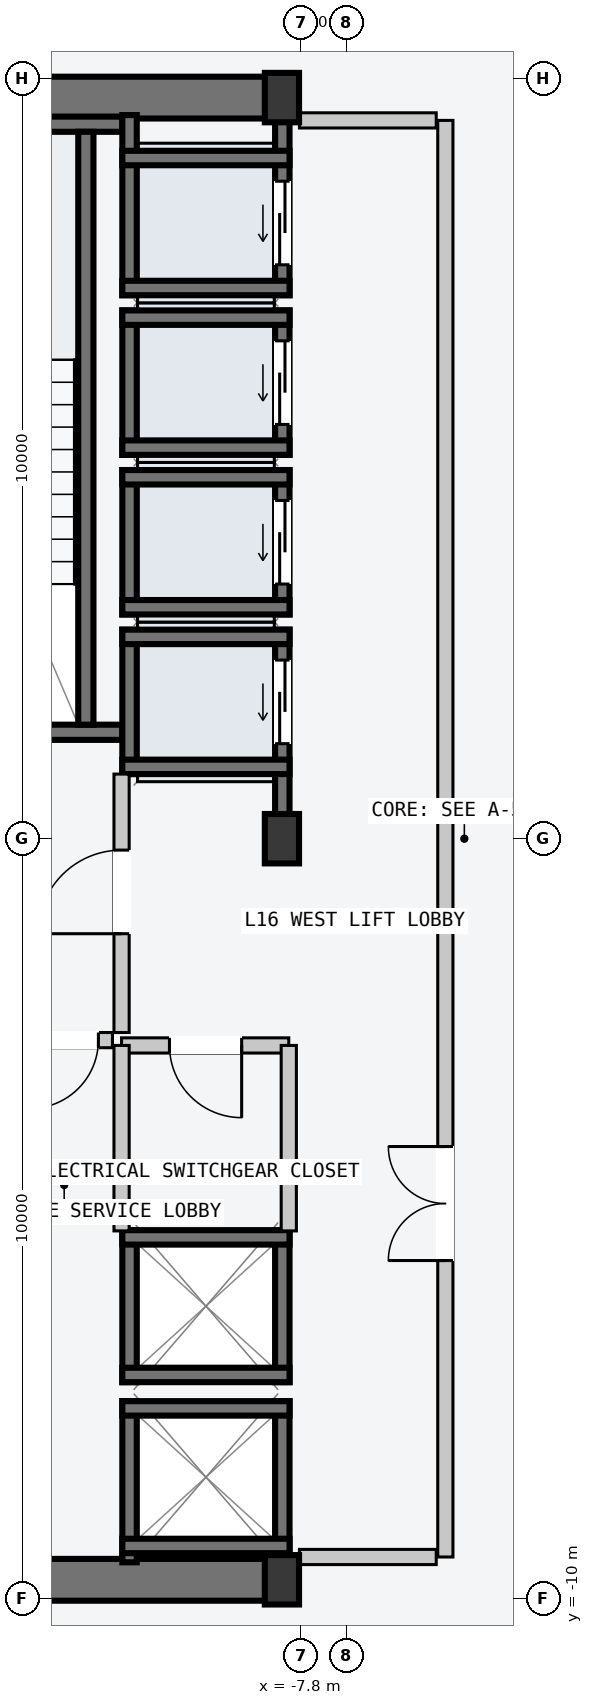
"""IFC4 building model, lengths in metres.
Left out: names, types, materials, properties, quantities, classifications, styles, units other than length and angle.
Written with IfcOpenShell. Run it as: python <this file> out.ifc"""

import sys

from ifc_helpers import new_model, si_unit, direction, frame, frame_2d, origin, origin_2d, place, context, subcontext, project, spatial, rectangle, i_section, extrude, element, fill, save


model = new_model("IFC4")
c1 = context("Model", 3, precision=1e-05, world=origin(), true_north=direction((0.0, 1.0)))
c2 = subcontext(c1, "Body", "Model", "MODEL_VIEW")
j1 = project(units=[si_unit("LENGTHUNIT", "METRE"), si_unit("PLANEANGLEUNIT", "RADIAN")], contexts=[c1])
p1 = place(None, origin())
s1 = spatial("IfcSite", under=j1, at=p1, CompositionType="ELEMENT")
p2 = place(p1, origin())
s2 = spatial("IfcBuilding", under=s1, at=p2, CompositionType="ELEMENT")
p3 = place(p2, frame((0.0, 0.0, 63.6)))
s3 = spatial("IfcBuildingStorey", under=s2, at=p3, CompositionType="ELEMENT", Elevation=63.6)
for number, where, z_axis, x_axis in (
    (1, (-14.53, -9.75, -0.2), (0.0, 0.0, 1.0), (1.0, 0.0, 0.0)),
    (2, (-14.53, 9.75, -0.2), (0.0, 0.0, 1.0), (1.0, 0.0, 0.0)),
):
    element("IfcWall", number, at=place(p3, frame(where, z_axis=z_axis, x_axis=x_axis)), inside=s3, PredefinedType="SHEAR", context=c2, shape_type="SweptSolid", body=[
        extrude(rectangle(XDim=6.46, YDim=0.55, at=frame_2d((3.23, 0.0))), origin(), (0.0, 0.0, 1.0), 3.6),
    ])
p4 = place(p3, frame((-14.25, 1.4, -0.2), z_axis=(0.0, 0.0, 1.0), x_axis=(1.0, 0.0, 0.0)))
e3 = element("IfcWall", 3, at=p4, inside=s3, PredefinedType="SOLIDWALL", context=c2, shape_type="SweptSolid", body=[
    extrude(rectangle(XDim=4.1, YDim=0.2, at=frame_2d((2.05, 0.0))), origin(), (0.0, 0.0, 1.0), 3.6),
])
p5 = place(p4, frame((1.5, 0.0, 0.2)))
e4 = element("IfcOpeningElement", 4, at=p5, cuts=e3, PredefinedType="OPENING", context=c2, shape_type="SweptSolid", body=[
    extrude(rectangle(XDim=1.12, YDim=2.18, at=frame_2d((0.56, 1.09))), frame((0.0, 0.11, 0.0), z_axis=(0.0, -1.0, 0.0), x_axis=(1.0, 0.0, 0.0)), (0.0, 0.0, 1.0), 0.22),
])
p6 = place(p3, frame((-14.25, 9.4, -0.2), z_axis=(0.0, 0.0, 1.0), x_axis=(1.0, 0.0, 0.0)))
e5 = element("IfcWall", 5, at=p6, inside=s3, PredefinedType="SOLIDWALL", context=c2, shape_type="SweptSolid", body=[
    extrude(rectangle(XDim=4.1, YDim=0.2, at=frame_2d((2.05, 0.0))), origin(), (0.0, 0.0, 1.0), 3.6),
])
p7 = place(p3, frame((-10.63, 1.5, -0.2), z_axis=(0.0, 0.0, 1.0), x_axis=(0.0, 1.0, 0.0)))
e6 = element("IfcWall", 6, at=p7, inside=s3, PredefinedType="SOLIDWALL", context=c2, shape_type="SweptSolid", body=[
    extrude(rectangle(XDim=7.8, YDim=0.2, at=frame_2d((3.9, 0.0))), origin(), (0.0, 0.0, 1.0), 3.6),
])
for number, where, z_axis, x_axis in (
    (7, (-8.05, -9.75, 0.0), (0.0, 0.0, 1.0), (1.0, 0.0, 0.0)),
    (8, (-8.05, 0.0, 0.0), (0.0, 0.0, 1.0), (1.0, 0.0, 0.0)),
    (9, (-8.05, 9.75, 0.0), (0.0, 0.0, 1.0), (1.0, 0.0, 0.0)),
):
    element("IfcColumn", number, at=place(p3, frame(where, z_axis=z_axis, x_axis=x_axis)), inside=s3, PredefinedType="COLUMN", context=c2, shape_type="SweptSolid", body=[
        extrude(i_section(OverallWidth=0.45, OverallDepth=0.65, WebThickness=0.025, FlangeThickness=0.04, at=origin_2d()), origin(), (0.0, 0.0, 1.0), 3.6),
    ])
p8 = place(p3, frame((-8.045, 0.21, -0.2), z_axis=(0.0, 0.0, 1.0), x_axis=(0.0, 1.0, 0.0)))
e10 = element("IfcWall", 10, at=p8, inside=s3, PredefinedType="SOLIDWALL", context=c2, shape_type="SweptSolid", body=[
    extrude(rectangle(XDim=2.54, YDim=0.19, at=frame_2d((1.27, 0.0))), origin(), (0.0, 0.0, 1.0), 3.6),
])
p9 = place(p8, frame((1.04, 0.0, 0.2)))
e11 = element("IfcOpeningElement", 11, at=p9, cuts=e10, PredefinedType="OPENING", context=c2, shape_type="SweptSolid", body=[
    extrude(rectangle(XDim=1.1, YDim=2.2, at=frame_2d((0.55, 1.1))), frame((0.0, 0.105, 0.0), z_axis=(0.0, -1.0, 0.0), x_axis=(1.0, 0.0, 0.0)), (0.0, 0.0, 1.0), 0.21),
])
p10 = place(p3, frame((-10.055, 0.85, -0.2), z_axis=(0.0, 0.0, 1.0), x_axis=(0.0, 1.0, 0.0)))
e12 = element("IfcWall", 12, at=p10, inside=s3, PredefinedType="SOLIDWALL", context=c2, shape_type="SweptSolid", body=[
    extrude(rectangle(XDim=1.9, YDim=0.19, at=frame_2d((0.95, 0.0))), origin(), (0.0, 0.0, 1.0), 3.6),
])
for number, where, z_axis, x_axis in (
    (13, (-10.15, 2.655, -0.2), (0.0, 0.0, 1.0), (1.0, 0.0, 0.0)),
    (14, (-10.15, 0.945, -0.2), (0.0, 0.0, 1.0), (1.0, 0.0, 0.0)),
):
    element("IfcWall", number, at=place(p3, frame(where, z_axis=z_axis, x_axis=x_axis)), inside=s3, PredefinedType="SOLIDWALL", context=c2, shape_type="SweptSolid", body=[
        extrude(rectangle(XDim=2.2, YDim=0.19, at=frame_2d((1.1, 0.0))), origin(), (0.0, 0.0, 1.0), 3.6),
    ])
p11 = place(p3, frame((-8.045, 2.95, -0.2), z_axis=(0.0, 0.0, 1.0), x_axis=(0.0, 1.0, 0.0)))
e15 = element("IfcWall", 15, at=p11, inside=s3, PredefinedType="SOLIDWALL", context=c2, shape_type="SweptSolid", body=[
    extrude(rectangle(XDim=1.9, YDim=0.19, at=frame_2d((0.95, 0.0))), origin(), (0.0, 0.0, 1.0), 3.6),
])
p12 = place(p11, frame((0.4, 0.0, 0.2)))
e16 = element("IfcOpeningElement", 16, at=p12, cuts=e15, PredefinedType="OPENING", context=c2, shape_type="SweptSolid", body=[
    extrude(rectangle(XDim=1.1, YDim=2.2, at=frame_2d((0.55, 1.1))), frame((0.0, 0.105, 0.0), z_axis=(0.0, -1.0, 0.0), x_axis=(1.0, 0.0, 0.0)), (0.0, 0.0, 1.0), 0.21),
])
p13 = place(p3, frame((-10.055, 2.95, -0.2), z_axis=(0.0, 0.0, 1.0), x_axis=(0.0, 1.0, 0.0)))
e17 = element("IfcWall", 17, at=p13, inside=s3, PredefinedType="SOLIDWALL", context=c2, shape_type="SweptSolid", body=[
    extrude(rectangle(XDim=1.9, YDim=0.19, at=frame_2d((0.95, 0.0))), origin(), (0.0, 0.0, 1.0), 3.6),
])
for number, where, z_axis, x_axis in (
    (18, (-10.15, 4.755, -0.2), (0.0, 0.0, 1.0), (1.0, 0.0, 0.0)),
    (19, (-10.15, 3.045, -0.2), (0.0, 0.0, 1.0), (1.0, 0.0, 0.0)),
):
    element("IfcWall", number, at=place(p3, frame(where, z_axis=z_axis, x_axis=x_axis)), inside=s3, PredefinedType="SOLIDWALL", context=c2, shape_type="SweptSolid", body=[
        extrude(rectangle(XDim=2.2, YDim=0.19, at=frame_2d((1.1, 0.0))), origin(), (0.0, 0.0, 1.0), 3.6),
    ])
p14 = place(p3, frame((-8.045, 5.05, -0.2), z_axis=(0.0, 0.0, 1.0), x_axis=(0.0, 1.0, 0.0)))
e20 = element("IfcWall", 20, at=p14, inside=s3, PredefinedType="SOLIDWALL", context=c2, shape_type="SweptSolid", body=[
    extrude(rectangle(XDim=1.9, YDim=0.19, at=frame_2d((0.95, 0.0))), origin(), (0.0, 0.0, 1.0), 3.6),
])
p15 = place(p14, frame((0.4, 0.0, 0.2)))
e21 = element("IfcOpeningElement", 21, at=p15, cuts=e20, PredefinedType="OPENING", context=c2, shape_type="SweptSolid", body=[
    extrude(rectangle(XDim=1.1, YDim=2.2, at=frame_2d((0.55, 1.1))), frame((0.0, 0.105, 0.0), z_axis=(0.0, -1.0, 0.0), x_axis=(1.0, 0.0, 0.0)), (0.0, 0.0, 1.0), 0.21),
])
p16 = place(p3, frame((-10.055, 5.05, -0.2), z_axis=(0.0, 0.0, 1.0), x_axis=(0.0, 1.0, 0.0)))
e22 = element("IfcWall", 22, at=p16, inside=s3, PredefinedType="SOLIDWALL", context=c2, shape_type="SweptSolid", body=[
    extrude(rectangle(XDim=1.9, YDim=0.19, at=frame_2d((0.95, 0.0))), origin(), (0.0, 0.0, 1.0), 3.6),
])
for number, where, z_axis, x_axis in (
    (23, (-10.15, 6.855, -0.2), (0.0, 0.0, 1.0), (1.0, 0.0, 0.0)),
    (24, (-10.15, 5.145, -0.2), (0.0, 0.0, 1.0), (1.0, 0.0, 0.0)),
):
    element("IfcWall", number, at=place(p3, frame(where, z_axis=z_axis, x_axis=x_axis)), inside=s3, PredefinedType="SOLIDWALL", context=c2, shape_type="SweptSolid", body=[
        extrude(rectangle(XDim=2.2, YDim=0.19, at=frame_2d((1.1, 0.0))), origin(), (0.0, 0.0, 1.0), 3.6),
    ])
p17 = place(p3, frame((-8.045, 7.15, -0.2), z_axis=(0.0, 0.0, 1.0), x_axis=(0.0, 1.0, 0.0)))
e25 = element("IfcWall", 25, at=p17, inside=s3, PredefinedType="SOLIDWALL", context=c2, shape_type="SweptSolid", body=[
    extrude(rectangle(XDim=2.37, YDim=0.19, at=frame_2d((1.185, 0.0))), origin(), (0.0, 0.0, 1.0), 3.6),
])
p18 = place(p17, frame((0.4, 0.0, 0.2)))
e26 = element("IfcOpeningElement", 26, at=p18, cuts=e25, PredefinedType="OPENING", context=c2, shape_type="SweptSolid", body=[
    extrude(rectangle(XDim=1.1, YDim=2.2, at=frame_2d((0.55, 1.1))), frame((0.0, 0.105, 0.0), z_axis=(0.0, -1.0, 0.0), x_axis=(1.0, 0.0, 0.0)), (0.0, 0.0, 1.0), 0.21),
])
p19 = place(p3, frame((-10.055, 7.15, -0.2), z_axis=(0.0, 0.0, 1.0), x_axis=(0.0, 1.0, 0.0)))
e27 = element("IfcWall", 27, at=p19, inside=s3, PredefinedType="SOLIDWALL", context=c2, shape_type="SweptSolid", body=[
    extrude(rectangle(XDim=2.37, YDim=0.19, at=frame_2d((1.185, 0.0))), origin(), (0.0, 0.0, 1.0), 3.6),
])
for number, where, z_axis, x_axis in (
    (28, (-10.15, 8.955, -0.2), (0.0, 0.0, 1.0), (1.0, 0.0, 0.0)),
    (29, (-10.15, 7.245, -0.2), (0.0, 0.0, 1.0), (1.0, 0.0, 0.0)),
):
    element("IfcWall", number, at=place(p3, frame(where, z_axis=z_axis, x_axis=x_axis)), inside=s3, PredefinedType="SOLIDWALL", context=c2, shape_type="SweptSolid", body=[
        extrude(rectangle(XDim=2.2, YDim=0.19, at=frame_2d((1.1, 0.0))), origin(), (0.0, 0.0, 1.0), 3.6),
    ])
for number, where, z_axis, x_axis in (
    (30, (-8.045, -9.52, -0.2), (0.0, 0.0, 1.0), (0.0, 1.0, 0.0)),
    (31, (-10.055, -9.52, -0.2), (0.0, 0.0, 1.0), (0.0, 1.0, 0.0)),
):
    element("IfcWall", number, at=place(p3, frame(where, z_axis=z_axis, x_axis=x_axis)), inside=s3, PredefinedType="SOLIDWALL", context=c2, shape_type="SweptSolid", body=[
        extrude(rectangle(XDim=2.12, YDim=0.19, at=frame_2d((1.06, 0.0))), origin(), (0.0, 0.0, 1.0), 3.6),
    ])
for number, where, z_axis, x_axis in (
    (32, (-10.15, -7.495, -0.2), (0.0, 0.0, 1.0), (1.0, 0.0, 0.0)),
    (33, (-10.15, -9.305, -0.2), (0.0, 0.0, 1.0), (1.0, 0.0, 0.0)),
):
    element("IfcWall", number, at=place(p3, frame(where, z_axis=z_axis, x_axis=x_axis)), inside=s3, PredefinedType="SOLIDWALL", context=c2, shape_type="SweptSolid", body=[
        extrude(rectangle(XDim=2.2, YDim=0.19, at=frame_2d((1.1, 0.0))), origin(), (0.0, 0.0, 1.0), 3.6),
    ])
for number, where, z_axis, x_axis in (
    (34, (-8.045, -7.15, -0.2), (0.0, 0.0, 1.0), (0.0, 1.0, 0.0)),
    (35, (-10.055, -7.15, -0.2), (0.0, 0.0, 1.0), (0.0, 1.0, 0.0)),
):
    element("IfcWall", number, at=place(p3, frame(where, z_axis=z_axis, x_axis=x_axis)), inside=s3, PredefinedType="SOLIDWALL", context=c2, shape_type="SweptSolid", body=[
        extrude(rectangle(XDim=2.0, YDim=0.19, at=frame_2d((1.0, 0.0))), origin(), (0.0, 0.0, 1.0), 3.6),
    ])
for number, where, z_axis, x_axis in (
    (36, (-10.15, -5.245, -0.2), (0.0, 0.0, 1.0), (1.0, 0.0, 0.0)),
    (37, (-10.15, -7.055, -0.2), (0.0, 0.0, 1.0), (1.0, 0.0, 0.0)),
):
    element("IfcWall", number, at=place(p3, frame(where, z_axis=z_axis, x_axis=x_axis)), inside=s3, PredefinedType="SOLIDWALL", context=c2, shape_type="SweptSolid", body=[
        extrude(rectangle(XDim=2.2, YDim=0.19, at=frame_2d((1.1, 0.0))), origin(), (0.0, 0.0, 1.0), 3.6),
    ])
p20 = place(p3, frame((-5.9, -9.45, 0.0), z_axis=(0.0, 0.0, 1.0), x_axis=(0.0, 1.0, 0.0)))
e38 = element("IfcWall", 38, at=p20, inside=s3, PredefinedType="PARTITIONING", context=c2, shape_type="SweptSolid", body=[
    extrude(rectangle(XDim=18.9, YDim=0.2, at=frame_2d((9.45, 0.0))), origin(), (0.0, 0.0, 1.0), 3.4),
])
p21 = place(p20, frame((3.9, 0.0, 0.0)))
e39 = element("IfcOpeningElement", 39, at=p21, cuts=e38, PredefinedType="OPENING", context=c2, shape_type="SweptSolid", body=[
    extrude(rectangle(XDim=1.5, YDim=2.2, at=frame_2d((0.75, 1.1))), frame((0.0, 0.11, 0.0), z_axis=(0.0, -1.0, 0.0), x_axis=(1.0, 0.0, 0.0)), (0.0, 0.0, 1.0), 0.22),
])
for number, where, z_axis, x_axis in (
    (40, (-6.02, -9.45, 0.0), (0.0, 0.0, 1.0), (-1.0, 0.0, 0.0)),
    (41, (-6.02, 9.45, 0.0), (0.0, 0.0, 1.0), (-1.0, 0.0, 0.0)),
):
    element("IfcWall", number, at=place(p3, frame(where, z_axis=z_axis, x_axis=x_axis)), inside=s3, PredefinedType="PARTITIONING", context=c2, shape_type="SweptSolid", body=[
        extrude(rectangle(XDim=1.8, YDim=0.2, at=frame_2d((0.9, 0.0))), origin(), (0.0, 0.0, 1.0), 3.4),
    ])
p22 = place(p3, frame((-10.16, -2.55, 0.0), z_axis=(0.0, 0.0, 1.0), x_axis=(0.0, 1.0, 0.0)))
e42 = element("IfcWall", 42, at=p22, inside=s3, PredefinedType="PARTITIONING", context=c2, shape_type="SweptSolid", body=[
    extrude(rectangle(XDim=3.4, YDim=0.2, at=frame_2d((1.7, 0.0))), origin(), (0.0, 0.0, 1.0), 3.4),
])
p23 = place(p22, frame((1.3, 0.0, 0.0)))
e43 = element("IfcOpeningElement", 43, at=p23, cuts=e42, PredefinedType="OPENING", context=c2, shape_type="SweptSolid", body=[
    extrude(rectangle(XDim=1.1, YDim=2.15, at=frame_2d((0.55, 1.075))), frame((0.0, 0.11, 0.0), z_axis=(0.0, -1.0, 0.0), x_axis=(1.0, 0.0, 0.0)), (0.0, 0.0, 1.0), 0.22),
])
p24 = place(p3, frame((-10.28, -2.65, 0.0), z_axis=(0.0, 0.0, 1.0), x_axis=(-1.0, 0.0, 0.0)))
e44 = element("IfcWall", 44, at=p24, inside=s3, PredefinedType="PARTITIONING", context=c2, shape_type="SweptSolid", body=[
    extrude(rectangle(XDim=1.27, YDim=0.2, at=frame_2d((0.635, 0.0))), origin(), (0.0, 0.0, 1.0), 3.4),
])
p25 = place(p24, frame((0.185, 0.0, 0.0)))
e45 = element("IfcOpeningElement", 45, at=p25, cuts=e44, PredefinedType="OPENING", context=c2, shape_type="SweptSolid", body=[
    extrude(rectangle(XDim=0.9, YDim=2.15, at=frame_2d((0.45, 1.075))), frame((0.0, 0.11, 0.0), z_axis=(0.0, -1.0, 0.0), x_axis=(1.0, 0.0, 0.0)), (0.0, 0.0, 1.0), 0.22),
])
p26 = place(p3, frame((-7.96, -2.72, 0.0), z_axis=(0.0, 0.0, 1.0), x_axis=(-1.0, 0.0, 0.0)))
e46 = element("IfcWall", 46, at=p26, inside=s3, PredefinedType="PARTITIONING", context=c2, shape_type="SweptSolid", body=[
    extrude(rectangle(XDim=2.2, YDim=0.2, at=frame_2d((1.1, 0.0))), origin(), (0.0, 0.0, 1.0), 3.4),
])
p27 = place(p26, frame((0.62, 0.0, 0.0)))
e47 = element("IfcOpeningElement", 47, at=p27, cuts=e46, PredefinedType="OPENING", context=c2, shape_type="SweptSolid", body=[
    extrude(rectangle(XDim=0.95, YDim=2.1, at=frame_2d((0.475, 1.05))), frame((0.0, 0.11, 0.0), z_axis=(0.0, -1.0, 0.0), x_axis=(1.0, 0.0, 0.0)), (0.0, 0.0, 1.0), 0.22),
])
for number, where, z_axis, x_axis in (
    (48, (-7.96, -5.16, 0.0), (0.0, 0.0, 1.0), (0.0, 1.0, 0.0)),
    (49, (-10.16, -5.16, 0.0), (0.0, 0.0, 1.0), (0.0, 1.0, 0.0)),
):
    element("IfcWall", number, at=place(p3, frame(where, z_axis=z_axis, x_axis=x_axis)), inside=s3, PredefinedType="PARTITIONING", context=c2, shape_type="SweptSolid", body=[
        extrude(rectangle(XDim=2.44, YDim=0.2, at=frame_2d((1.22, 0.0))), origin(), (0.0, 0.0, 1.0), 3.4),
    ])
p28 = place(p9, origin())
e50 = element("IfcDoor", 50, at=p28, inside=s3, OperationType="SLIDING_TO_LEFT", PredefinedType="DOOR", context=c2, shape_type="SweptSolid", body=[
    extrude(rectangle(XDim=1.1, YDim=2.2, at=frame_2d((0.55, 1.1))), frame((0.0, 0.025, 0.0), z_axis=(0.0, -1.0, 0.0), x_axis=(1.0, 0.0, 0.0)), (0.0, 0.0, 1.0), 0.05),
])
fill(e11, e50)
p29 = place(p12, origin())
e51 = element("IfcDoor", 51, at=p29, inside=s3, OperationType="SLIDING_TO_LEFT", PredefinedType="DOOR", context=c2, shape_type="SweptSolid", body=[
    extrude(rectangle(XDim=1.1, YDim=2.2, at=frame_2d((0.55, 1.1))), frame((0.0, 0.025, 0.0), z_axis=(0.0, -1.0, 0.0), x_axis=(1.0, 0.0, 0.0)), (0.0, 0.0, 1.0), 0.05),
])
fill(e16, e51)
p30 = place(p15, origin())
e52 = element("IfcDoor", 52, at=p30, inside=s3, OperationType="SLIDING_TO_LEFT", PredefinedType="DOOR", context=c2, shape_type="SweptSolid", body=[
    extrude(rectangle(XDim=1.1, YDim=2.2, at=frame_2d((0.55, 1.1))), frame((0.0, 0.025, 0.0), z_axis=(0.0, -1.0, 0.0), x_axis=(1.0, 0.0, 0.0)), (0.0, 0.0, 1.0), 0.05),
])
fill(e21, e52)
p31 = place(p18, origin())
e53 = element("IfcDoor", 53, at=p31, inside=s3, OperationType="SLIDING_TO_LEFT", PredefinedType="DOOR", context=c2, shape_type="SweptSolid", body=[
    extrude(rectangle(XDim=1.1, YDim=2.2, at=frame_2d((0.55, 1.1))), frame((0.0, 0.025, 0.0), z_axis=(0.0, -1.0, 0.0), x_axis=(1.0, 0.0, 0.0)), (0.0, 0.0, 1.0), 0.05),
])
fill(e26, e53)
p32 = place(p21, origin())
e54 = element("IfcDoor", 54, at=p32, inside=s3, OperationType="DOUBLE_DOOR_SINGLE_SWING", PredefinedType="DOOR", context=c2, shape_type="SweptSolid", body=[
    extrude(rectangle(XDim=1.5, YDim=2.2, at=frame_2d((0.75, 1.1))), frame((0.0, 0.025, 0.0), z_axis=(0.0, -1.0, 0.0), x_axis=(1.0, 0.0, 0.0)), (0.0, 0.0, 1.0), 0.05),
])
fill(e39, e54)
p33 = place(p23, origin())
e55 = element("IfcDoor", 55, at=p33, inside=s3, OperationType="SINGLE_SWING_LEFT", PredefinedType="DOOR", context=c2, shape_type="SweptSolid", body=[
    extrude(rectangle(XDim=1.1, YDim=2.15, at=frame_2d((0.55, 1.075))), frame((0.0, 0.025, 0.0), z_axis=(0.0, -1.0, 0.0), x_axis=(1.0, 0.0, 0.0)), (0.0, 0.0, 1.0), 0.05),
])
fill(e43, e55)
p34 = place(p25, origin())
e56 = element("IfcDoor", 56, at=p34, inside=s3, OperationType="SINGLE_SWING_RIGHT", PredefinedType="DOOR", context=c2, shape_type="SweptSolid", body=[
    extrude(rectangle(XDim=0.9, YDim=2.15, at=frame_2d((0.45, 1.075))), frame((0.0, 0.025, 0.0), z_axis=(0.0, -1.0, 0.0), x_axis=(1.0, 0.0, 0.0)), (0.0, 0.0, 1.0), 0.05),
])
fill(e45, e56)
p35 = place(p27, origin())
e57 = element("IfcDoor", 57, at=p35, inside=s3, OperationType="SINGLE_SWING_LEFT", PredefinedType="DOOR", context=c2, shape_type="SweptSolid", body=[
    extrude(rectangle(XDim=0.95, YDim=2.1, at=frame_2d((0.475, 1.05))), frame((0.0, 0.025, 0.0), z_axis=(0.0, -1.0, 0.0), x_axis=(1.0, 0.0, 0.0)), (0.0, 0.0, 1.0), 0.05),
])
fill(e47, e57)
save(model, sys.argv[1])
